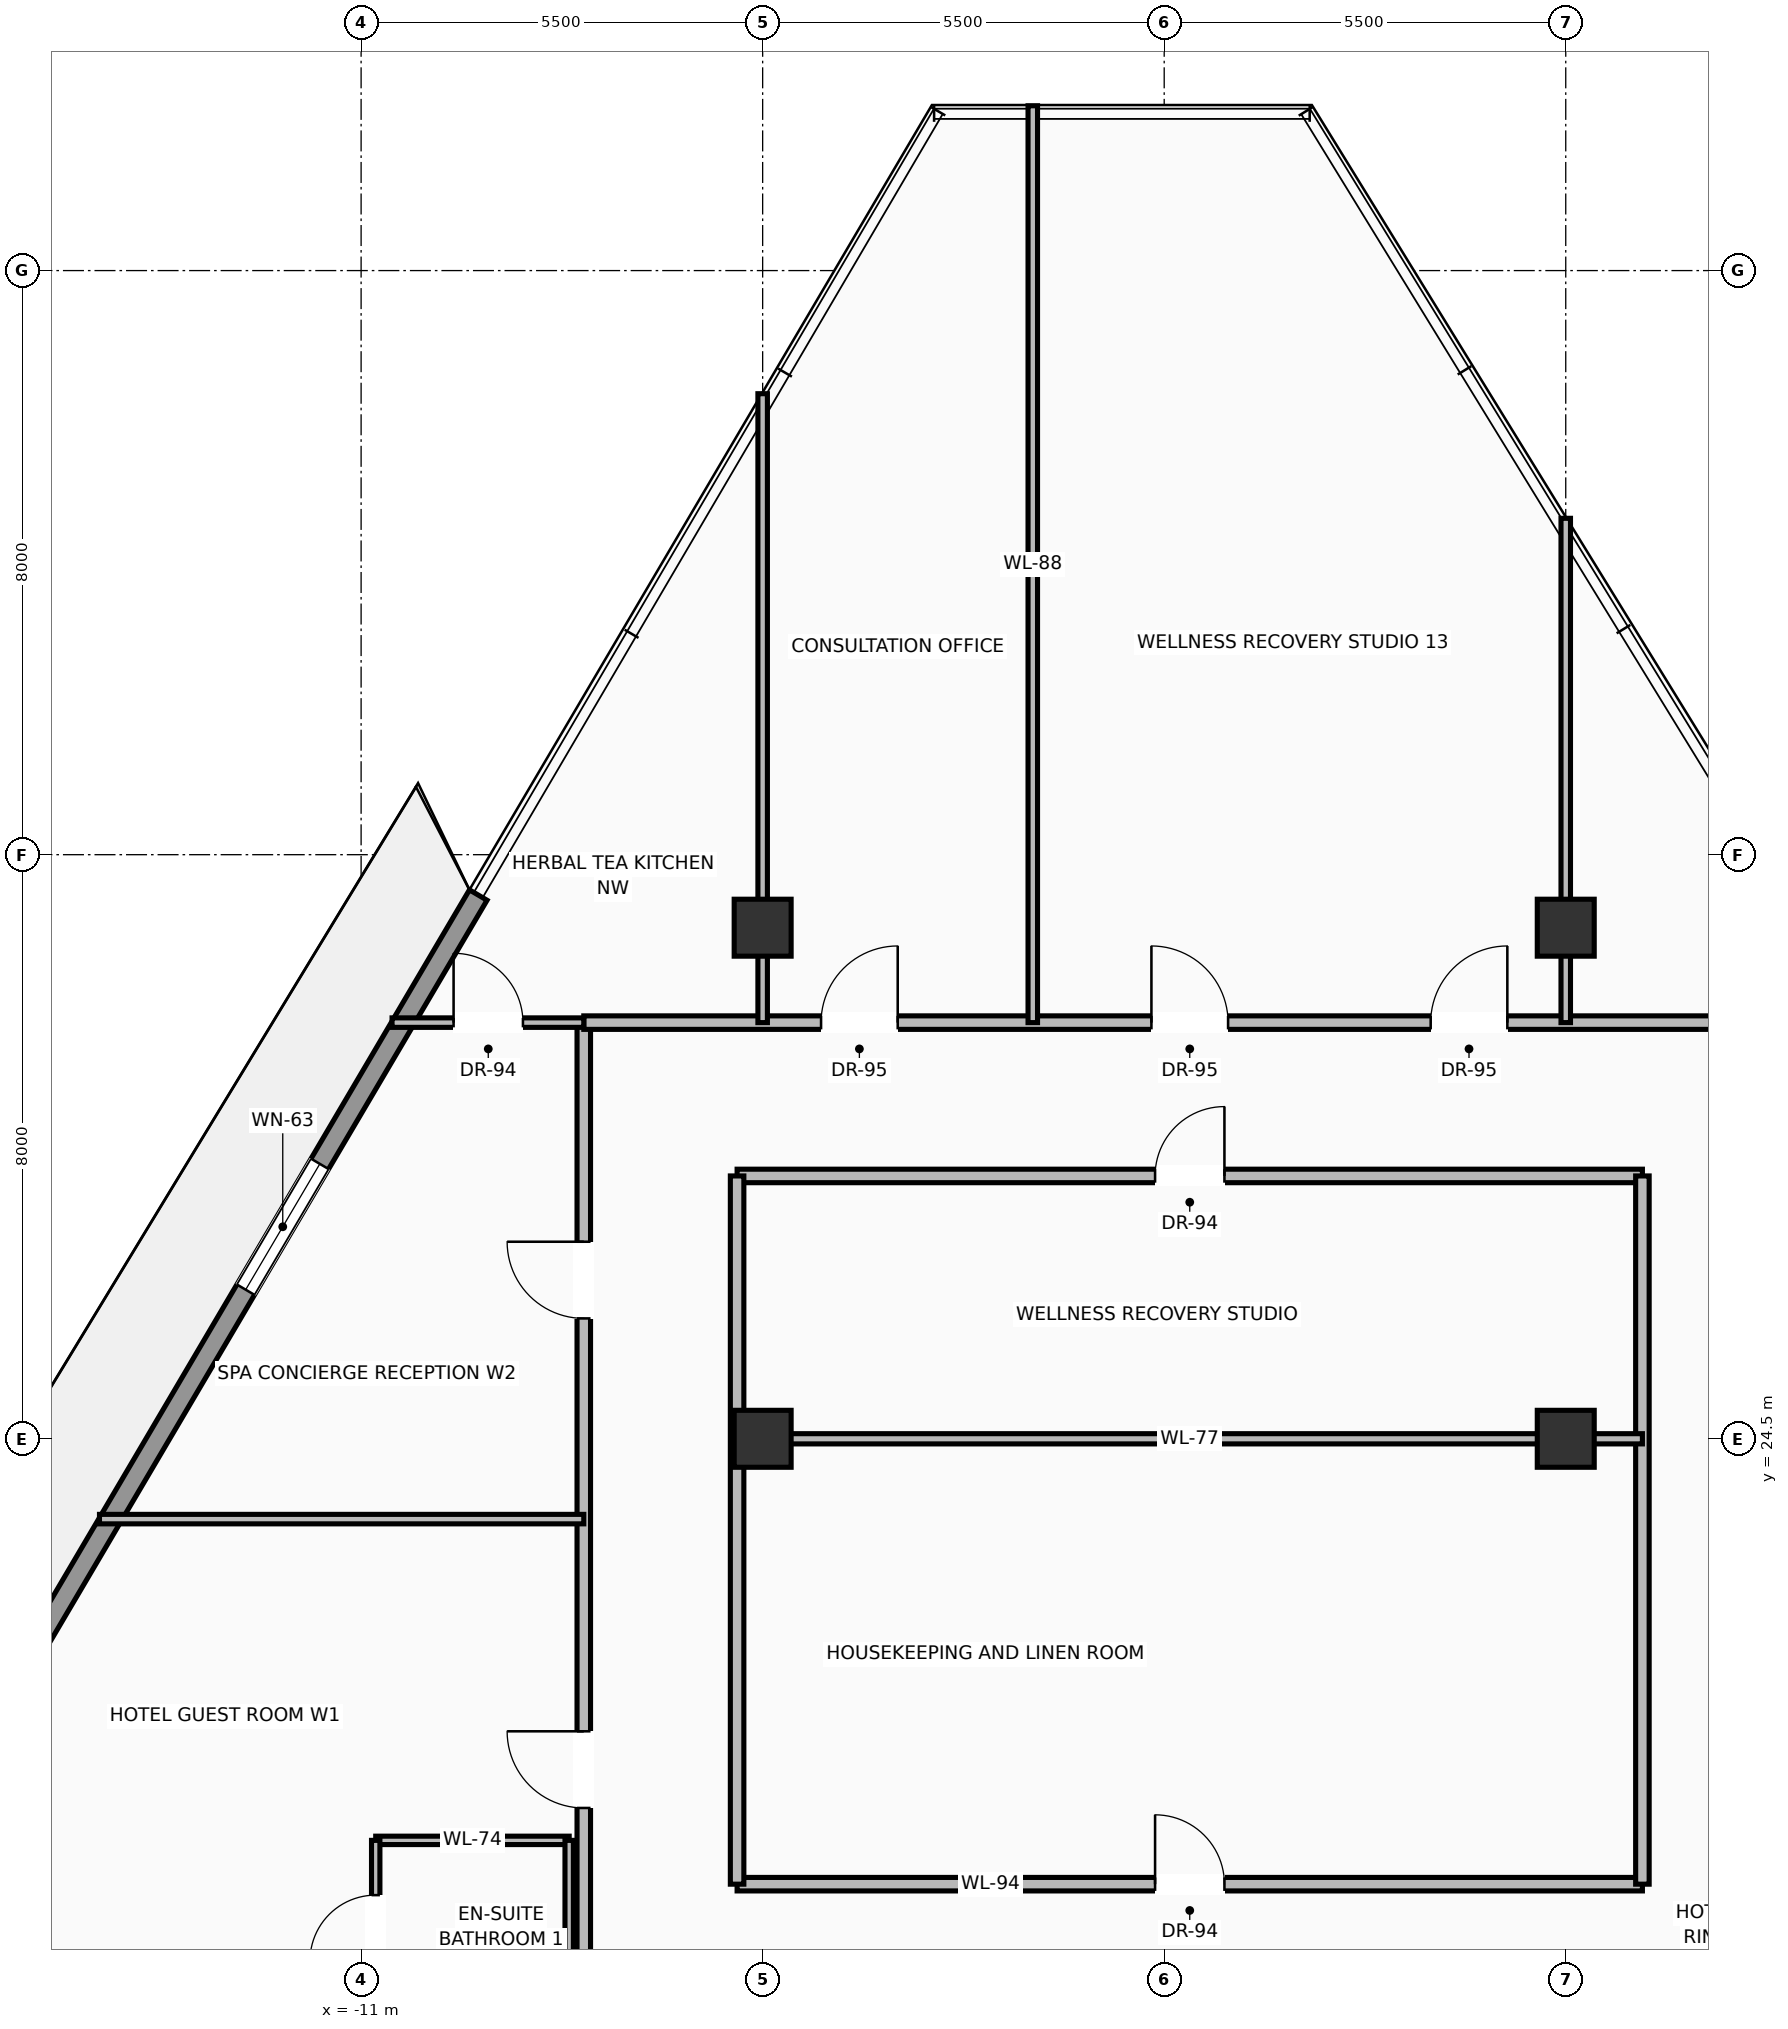
"""IFC4 building model, lengths in metres.
Left out: names, types, materials, properties, quantities, classifications, styles, units other than length and angle.
Written with IfcOpenShell. Run it as: python <this file> out.ifc"""

import sys

from ifc_helpers import new_model, si_unit, direction, frame, frame_2d, origin, origin_2d, place, context, subcontext, project, spatial, rectangle, extrude, source, transform, mapped, element, fill, save


model = new_model("IFC4")
c1 = context("Model", 3, precision=1e-05, world=origin(), true_north=direction((0.0, 1.0)))
c2 = subcontext(c1, "Body", "Model", "MODEL_VIEW")
j1 = project(units=[si_unit("LENGTHUNIT", "METRE"), si_unit("PLANEANGLEUNIT", "RADIAN")], contexts=[c1])
p1 = place(None, origin())
s1 = spatial("IfcSite", under=j1, at=p1, CompositionType="ELEMENT")
p2 = place(p1, origin())
s2 = spatial("IfcBuilding", under=s1, at=p2, CompositionType="ELEMENT")
p3 = place(p2, frame((0.0, 0.0, 240.7)))
s3 = spatial("IfcBuildingStorey", under=s2, at=p3, CompositionType="ELEMENT", Elevation=240.7)
m1 = source(origin(), c2, "Body", "SweptSolid", [
    extrude(rectangle(XDim=0.78, YDim=0.78, at=origin_2d()), origin(), (0.0, 0.0, 1.0), 3.45),
])
for number, where, z_axis, x_axis in (
    (1, (-5.5, 24.5, 0.0), (0.0, 0.0, 1.0), (1.0, 0.0, 0.0)),
    (2, (5.5, 24.5, 0.0), (0.0, 0.0, 1.0), (1.0, 0.0, 0.0)),
    (3, (-5.5, 31.5, 0.0), (0.0, 0.0, 1.0), (1.0, 0.0, 0.0)),
    (4, (5.5, 31.5, 0.0), (0.0, 0.0, 1.0), (1.0, 0.0, 0.0)),
):
    element("IfcColumn", number, at=place(p3, frame(where, z_axis=z_axis, x_axis=x_axis)), inside=s3, PredefinedType="COLUMN", context=c2, shape_type="MappedRepresentation", body=[
        mapped(m1, transform((0.0, 0.0, 0.0), scale=1.0)),
    ])
p4 = place(p3, frame((-19.35, 15.056, 0.0), z_axis=(0.0, 0.0, 1.0), x_axis=(0.507707822225, 0.861529318858, 0.0)))
e5 = element("IfcWall", 5, at=p4, inside=s3, PredefinedType="SOLIDWALL", context=c2, shape_type="SweptSolid", body=[
    extrude(rectangle(XDim=19.606, YDim=0.28, at=frame_2d((9.803, 0.0))), origin(), (0.0, 0.0, 1.0), 2.82),
])
p5 = place(p4, frame((4.705, 0.0, 0.0)))
e6 = element("IfcOpeningElement", 6, at=p5, cuts=e5, PredefinedType="OPENING", context=c2, shape_type="SweptSolid", body=[
    extrude(rectangle(XDim=1.6, YDim=2.35, at=frame_2d((0.8, 1.175))), frame((0.0, 0.15, 0.0), z_axis=(0.0, -1.0, 0.0), x_axis=(1.0, 0.0, 0.0)), (0.0, 0.0, 1.0), 0.3),
])
p6 = place(p4, frame((13.332, 0.0, 0.9)))
e7 = element("IfcOpeningElement", 7, at=p6, cuts=e5, PredefinedType="OPENING", context=c2, shape_type="SweptSolid", body=[
    extrude(rectangle(XDim=2.0, YDim=1.75, at=frame_2d((1.0, 0.875))), frame((0.0, 0.15, 0.0), z_axis=(0.0, -1.0, 0.0), x_axis=(1.0, 0.0, 0.0)), (0.0, 0.0, 1.0), 0.3),
])
p7 = place(p3, frame((-5.85, 18.4, 0.0), z_axis=(0.0, 0.0, 1.0), x_axis=(1.0, 0.0, 0.0)))
e8 = element("IfcWall", 8, at=p7, inside=s3, PredefinedType="PARTITIONING", context=c2, shape_type="SweptSolid", body=[
    extrude(rectangle(XDim=12.4, YDim=0.185, at=frame_2d((6.2, 0.0))), origin(), (0.0, 0.0, 1.0), 3.232),
])
p8 = place(p7, frame((5.725, 0.0, 0.0)))
e9 = element("IfcOpeningElement", 9, at=p8, cuts=e8, PredefinedType="OPENING", context=c2, shape_type="SweptSolid", body=[
    extrude(rectangle(XDim=0.95, YDim=2.2, at=frame_2d((0.475, 1.1))), frame((0.0, 0.103, 0.0), z_axis=(0.0, -1.0, 0.0), x_axis=(1.0, 0.0, 0.0)), (0.0, 0.0, 1.0), 0.205),
])
p9 = place(p3, frame((-5.85, 28.1, 0.0), z_axis=(0.0, 0.0, 1.0), x_axis=(1.0, 0.0, 0.0)))
e10 = element("IfcWall", 10, at=p9, inside=s3, PredefinedType="PARTITIONING", context=c2, shape_type="SweptSolid", body=[
    extrude(rectangle(XDim=12.4, YDim=0.185, at=frame_2d((6.2, 0.0))), origin(), (0.0, 0.0, 1.0), 2.885),
])
p10 = place(p9, frame((5.725, 0.0, 0.0)))
e11 = element("IfcOpeningElement", 11, at=p10, cuts=e10, PredefinedType="OPENING", context=c2, shape_type="SweptSolid", body=[
    extrude(rectangle(XDim=0.95, YDim=2.2, at=frame_2d((0.475, 1.1))), frame((0.0, 0.103, 0.0), z_axis=(0.0, -1.0, 0.0), x_axis=(1.0, 0.0, 0.0)), (0.0, 0.0, 1.0), 0.205),
])
for number, where, z_axis, x_axis in (
    (12, (-5.85, 18.4, 0.0), (0.0, 0.0, 1.0), (0.0, 1.0, 0.0)),
    (13, (6.55, 18.4, 0.0), (0.0, 0.0, 1.0), (0.0, 1.0, 0.0)),
):
    element("IfcWall", number, at=place(p3, frame(where, z_axis=z_axis, x_axis=x_axis)), inside=s3, PredefinedType="PARTITIONING", context=c2, shape_type="SweptSolid", body=[
        extrude(rectangle(XDim=9.7, YDim=0.185, at=frame_2d((4.85, 0.0))), origin(), (0.0, 0.0, 1.0), 3.232),
    ])
p11 = place(p3, frame((-7.95, 16.3, 0.0), z_axis=(0.0, 0.0, 1.0), x_axis=(0.0, 1.0, 0.0)))
e14 = element("IfcWall", 14, at=p11, inside=s3, PredefinedType="PARTITIONING", context=c2, shape_type="SweptSolid", body=[
    extrude(rectangle(XDim=13.9, YDim=0.185, at=frame_2d((6.95, 0.0))), origin(), (0.0, 0.0, 1.0), 3.232),
])
p12 = place(p11, frame((3.144, 0.0, 0.0)))
e15 = element("IfcOpeningElement", 15, at=p12, cuts=e14, PredefinedType="OPENING", context=c2, shape_type="SweptSolid", body=[
    extrude(rectangle(XDim=1.05, YDim=2.25, at=frame_2d((0.525, 1.125))), frame((0.0, 0.103, 0.0), z_axis=(0.0, -1.0, 0.0), x_axis=(1.0, 0.0, 0.0)), (0.0, 0.0, 1.0), 0.205),
])
p13 = place(p11, frame((9.849, 0.0, 0.0)))
e16 = element("IfcOpeningElement", 16, at=p13, cuts=e14, PredefinedType="OPENING", context=c2, shape_type="SweptSolid", body=[
    extrude(rectangle(XDim=1.05, YDim=2.25, at=frame_2d((0.525, 1.125))), frame((0.0, 0.103, 0.0), z_axis=(0.0, -1.0, 0.0), x_axis=(1.0, 0.0, 0.0)), (0.0, 0.0, 1.0), 0.205),
])
p14 = place(p3, frame((-7.95, 30.2, 0.0), z_axis=(0.0, 0.0, 1.0), x_axis=(1.0, 0.0, 0.0)))
e17 = element("IfcWall", 17, at=p14, inside=s3, PredefinedType="PARTITIONING", context=c2, shape_type="SweptSolid", body=[
    extrude(rectangle(XDim=16.6, YDim=0.185, at=frame_2d((8.3, 0.0))), origin(), (0.0, 0.0, 1.0), 3.232),
])
p15 = place(p14, frame((3.25, 0.0, 0.0)))
e18 = element("IfcOpeningElement", 18, at=p15, cuts=e17, PredefinedType="OPENING", context=c2, shape_type="SweptSolid", body=[
    extrude(rectangle(XDim=1.05, YDim=2.25, at=frame_2d((0.525, 1.125))), frame((0.0, 0.103, 0.0), z_axis=(0.0, -1.0, 0.0), x_axis=(1.0, 0.0, 0.0)), (0.0, 0.0, 1.0), 0.205),
])
p16 = place(p14, frame((7.775, 0.0, 0.0)))
e19 = element("IfcOpeningElement", 19, at=p16, cuts=e17, PredefinedType="OPENING", context=c2, shape_type="SweptSolid", body=[
    extrude(rectangle(XDim=1.05, YDim=2.25, at=frame_2d((0.525, 1.125))), frame((0.0, 0.103, 0.0), z_axis=(0.0, -1.0, 0.0), x_axis=(1.0, 0.0, 0.0)), (0.0, 0.0, 1.0), 0.205),
])
p17 = place(p14, frame((11.6, 0.0, 0.0)))
e20 = element("IfcOpeningElement", 20, at=p17, cuts=e17, PredefinedType="OPENING", context=c2, shape_type="SweptSolid", body=[
    extrude(rectangle(XDim=1.05, YDim=2.25, at=frame_2d((0.525, 1.125))), frame((0.0, 0.103, 0.0), z_axis=(0.0, -1.0, 0.0), x_axis=(1.0, 0.0, 0.0)), (0.0, 0.0, 1.0), 0.205),
])
p18 = place(p3, frame((-5.85, 24.5, 0.0), z_axis=(0.0, 0.0, 1.0), x_axis=(1.0, 0.0, 0.0)))
e21 = element("IfcWall", 21, at=p18, inside=s3, PredefinedType="PARTITIONING", context=c2, shape_type="SweptSolid", body=[
    extrude(rectangle(XDim=12.4, YDim=0.14, at=frame_2d((6.2, 0.0))), origin(), (0.0, 0.0, 1.0), 2.683),
])
p19 = place(p3, frame((-10.576, 30.2, 0.0), z_axis=(0.0, 0.0, 1.0), x_axis=(1.0, 0.0, 0.0)))
e22 = element("IfcWall", 22, at=p19, inside=s3, PredefinedType="PARTITIONING", context=c2, shape_type="SweptSolid", body=[
    extrude(rectangle(XDim=2.626, YDim=0.13, at=frame_2d((1.313, 0.0))), origin(), (0.0, 0.0, 1.0), 3.232),
])
p20 = place(p19, frame((0.843, 0.0, 0.0)))
e23 = element("IfcOpeningElement", 23, at=p20, cuts=e22, PredefinedType="OPENING", context=c2, shape_type="SweptSolid", body=[
    extrude(rectangle(XDim=0.95, YDim=2.2, at=frame_2d((0.475, 1.1))), frame((0.0, 0.075, 0.0), z_axis=(0.0, -1.0, 0.0), x_axis=(1.0, 0.0, 0.0)), (0.0, 0.0, 1.0), 0.15),
])
p21 = place(p3, frame((-5.5, 30.2, 0.0), z_axis=(0.0, 0.0, 1.0), x_axis=(0.0, 1.0, 0.0)))
e24 = element("IfcWall", 24, at=p21, inside=s3, PredefinedType="PARTITIONING", context=c2, shape_type="SweptSolid", body=[
    extrude(rectangle(XDim=8.614, YDim=0.13, at=frame_2d((4.307, 0.0))), origin(), (0.0, 0.0, 1.0), 2.683),
])
p22 = place(p3, frame((5.5, 30.2, 0.0), z_axis=(0.0, 0.0, 1.0), x_axis=(0.0, 1.0, 0.0)))
e25 = element("IfcWall", 25, at=p22, inside=s3, PredefinedType="PARTITIONING", context=c2, shape_type="SweptSolid", body=[
    extrude(rectangle(XDim=6.907, YDim=0.13, at=frame_2d((3.454, 0.0))), origin(), (0.0, 0.0, 1.0), 2.683),
])
p23 = place(p3, frame((-1.8, 30.2, 0.0), z_axis=(0.0, 0.0, 1.0), x_axis=(0.0, 1.0, 0.0)))
e26 = element("IfcWall", 26, at=p23, inside=s3, PredefinedType="PARTITIONING", context=c2, shape_type="SweptSolid", body=[
    extrude(rectangle(XDim=12.557, YDim=0.13, at=frame_2d((6.279, 0.0))), origin(), (0.0, 0.0, 1.0), 3.232),
])
p24 = place(p3, frame((-10.8, 19.0, 0.0), z_axis=(0.0, 0.0, 1.0), x_axis=(1.0, 0.0, 0.0)))
e27 = element("IfcWall", 27, at=p24, inside=s3, PredefinedType="PARTITIONING", context=c2, shape_type="SweptSolid", body=[
    extrude(rectangle(XDim=2.65, YDim=0.115, at=frame_2d((1.325, 0.0))), origin(), (0.0, 0.0, 1.0), 3.232),
])
p25 = place(p3, frame((-10.8, 16.6, 0.0), z_axis=(0.0, 0.0, 1.0), x_axis=(0.0, 1.0, 0.0)))
e28 = element("IfcWall", 28, at=p25, inside=s3, PredefinedType="PARTITIONING", context=c2, shape_type="SweptSolid", body=[
    extrude(rectangle(XDim=2.4, YDim=0.115, at=frame_2d((1.2, 0.0))), origin(), (0.0, 0.0, 1.0), 3.232),
])
p26 = place(p25, frame((0.75, 0.0, 0.0)))
e29 = element("IfcOpeningElement", 29, at=p26, cuts=e28, PredefinedType="OPENING", context=c2, shape_type="SweptSolid", body=[
    extrude(rectangle(XDim=0.9, YDim=2.15, at=frame_2d((0.45, 1.075))), frame((0.0, 0.067, 0.0), z_axis=(0.0, -1.0, 0.0), x_axis=(1.0, 0.0, 0.0)), (0.0, 0.0, 1.0), 0.135),
])
p27 = place(p3, frame((-8.15, 16.6, 0.0), z_axis=(0.0, 0.0, 1.0), x_axis=(0.0, 1.0, 0.0)))
e30 = element("IfcWall", 30, at=p27, inside=s3, PredefinedType="PARTITIONING", context=c2, shape_type="SweptSolid", body=[
    extrude(rectangle(XDim=2.4, YDim=0.115, at=frame_2d((1.2, 0.0))), origin(), (0.0, 0.0, 1.0), 3.232),
])
p28 = place(p3, frame((-14.583, 23.4, 0.0), z_axis=(0.0, 0.0, 1.0), x_axis=(1.0, 0.0, 0.0)))
e31 = element("IfcWall", 31, at=p28, inside=s3, PredefinedType="PARTITIONING", context=c2, shape_type="SweptSolid", body=[
    extrude(rectangle(XDim=6.634, YDim=0.13, at=frame_2d((3.317, 0.0))), origin(), (0.0, 0.0, 1.0), 3.232),
])
m2 = source(origin(), c2, "Body", "SweptSolid", [
    extrude(rectangle(XDim=2.0, YDim=1.75, at=frame_2d((1.0, 0.875))), frame((0.0, 0.03, 0.0), z_axis=(0.0, -1.0, 0.0), x_axis=(1.0, 0.0, 0.0)), (0.0, 0.0, 1.0), 0.06),
])
p29 = place(p6, origin())
e32 = element("IfcWindow", 32, at=p29, inside=s3, PartitioningType="SINGLE_PANEL", PredefinedType="WINDOW", context=c2, shape_type="MappedRepresentation", body=[
    mapped(m2, transform((0.0, 0.0, 0.0), scale=1.0)),
])
fill(e7, e32)
m3 = source(origin(), c2, "Body", "SweptSolid", [
    extrude(rectangle(XDim=0.95, YDim=2.2, at=frame_2d((0.475, 1.1))), frame((0.0, 0.025, 0.0), z_axis=(0.0, -1.0, 0.0), x_axis=(1.0, 0.0, 0.0)), (0.0, 0.0, 1.0), 0.05),
])
p30 = place(p8, origin())
e33 = element("IfcDoor", 33, at=p30, inside=s3, OperationType="SINGLE_SWING_LEFT", PredefinedType="DOOR", context=c2, shape_type="MappedRepresentation", body=[
    mapped(m3, transform((0.0, 0.0, 0.0), scale=1.0)),
])
fill(e9, e33)
p31 = place(p10, origin())
e34 = element("IfcDoor", 34, at=p31, inside=s3, OperationType="SINGLE_SWING_RIGHT", PredefinedType="DOOR", context=c2, shape_type="MappedRepresentation", body=[
    mapped(m3, transform((0.0, 0.0, 0.0), scale=1.0)),
])
fill(e11, e34)
m4 = source(origin(), c2, "Body", "SweptSolid", [
    extrude(rectangle(XDim=1.05, YDim=2.25, at=frame_2d((0.525, 1.125))), frame((0.0, 0.025, 0.0), z_axis=(0.0, -1.0, 0.0), x_axis=(1.0, 0.0, 0.0)), (0.0, 0.0, 1.0), 0.05),
])
p32 = place(p12, origin())
e35 = element("IfcDoor", 35, at=p32, inside=s3, OperationType="SINGLE_SWING_RIGHT", PredefinedType="DOOR", context=c2, shape_type="MappedRepresentation", body=[
    mapped(m4, transform((0.0, 0.0, 0.0), scale=1.0)),
])
fill(e15, e35)
m5 = source(origin(), c2, "Body", "SweptSolid", [
    extrude(rectangle(XDim=0.9, YDim=2.15, at=frame_2d((0.45, 1.075))), frame((0.0, 0.025, 0.0), z_axis=(0.0, -1.0, 0.0), x_axis=(1.0, 0.0, 0.0)), (0.0, 0.0, 1.0), 0.05),
])
p33 = place(p26, origin())
e36 = element("IfcDoor", 36, at=p33, inside=s3, OperationType="SINGLE_SWING_LEFT", PredefinedType="DOOR", context=c2, shape_type="MappedRepresentation", body=[
    mapped(m5, transform((0.0, 0.0, 0.0), scale=1.0)),
])
fill(e29, e36)
p34 = place(p13, origin())
e37 = element("IfcDoor", 37, at=p34, inside=s3, OperationType="SINGLE_SWING_RIGHT", PredefinedType="DOOR", context=c2, shape_type="MappedRepresentation", body=[
    mapped(m4, transform((0.0, 0.0, 0.0), scale=1.0)),
])
fill(e16, e37)
p35 = place(p15, origin())
e38 = element("IfcDoor", 38, at=p35, inside=s3, OperationType="SINGLE_SWING_RIGHT", PredefinedType="DOOR", context=c2, shape_type="MappedRepresentation", body=[
    mapped(m4, transform((0.0, 0.0, 0.0), scale=1.0)),
])
fill(e18, e38)
p36 = place(p16, origin())
e39 = element("IfcDoor", 39, at=p36, inside=s3, OperationType="SINGLE_SWING_LEFT", PredefinedType="DOOR", context=c2, shape_type="MappedRepresentation", body=[
    mapped(m4, transform((0.0, 0.0, 0.0), scale=1.0)),
])
fill(e19, e39)
p37 = place(p17, origin())
e40 = element("IfcDoor", 40, at=p37, inside=s3, OperationType="SINGLE_SWING_RIGHT", PredefinedType="DOOR", context=c2, shape_type="MappedRepresentation", body=[
    mapped(m4, transform((0.0, 0.0, 0.0), scale=1.0)),
])
fill(e20, e40)
p38 = place(p20, origin())
e41 = element("IfcDoor", 41, at=p38, inside=s3, OperationType="SINGLE_SWING_LEFT", PredefinedType="DOOR", context=c2, shape_type="MappedRepresentation", body=[
    mapped(m3, transform((0.0, 0.0, 0.0), scale=1.0)),
])
fill(e23, e41)
save(model, sys.argv[1])
